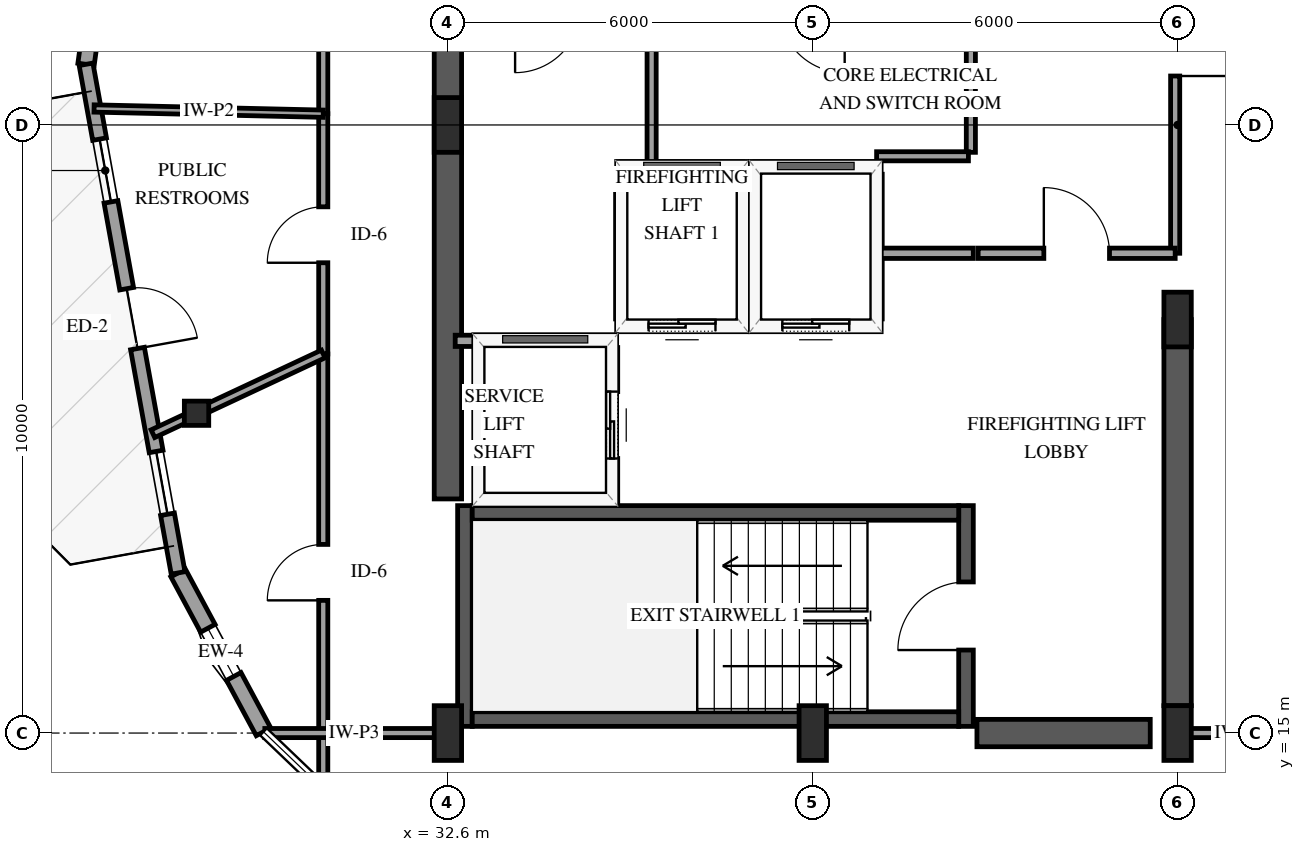
"""IFC4 building model, lengths in metres.
Left out: names, types, materials, properties, quantities, classifications, styles, units other than length and angle.
Written with IfcOpenShell. Run it as: python <this file> out.ifc"""

import sys

from ifc_helpers import new_model, si_unit, direction, frame, frame_2d, origin, origin_2d, place, context, subcontext, project, spatial, rectangle, i_section, extrude, element, fill, save


model = new_model("IFC4")
c1 = context("Model", 3, precision=1e-05, world=origin(), true_north=direction((0.0, 1.0)))
c2 = subcontext(c1, "Body", "Model", "MODEL_VIEW")
j1 = project(units=[si_unit("LENGTHUNIT", "METRE"), si_unit("PLANEANGLEUNIT", "RADIAN")], contexts=[c1])
p1 = place(None, origin())
s1 = spatial("IfcSite", under=j1, at=p1, CompositionType="ELEMENT")
p2 = place(p1, origin())
s2 = spatial("IfcBuilding", under=s1, at=p2, CompositionType="ELEMENT")
p3 = place(p2, frame((0.0, 0.0, 268.75)))
s3 = spatial("IfcBuildingStorey", under=s2, at=p3, CompositionType="ELEMENT", Elevation=268.75)
p4 = place(p3, frame((32.88, 15.11, 0.0), z_axis=(0.0, 0.0, 1.0), x_axis=(0.0, 1.0, 0.0)))
e1 = element("IfcWall", 1, at=p4, inside=s3, PredefinedType="SHEAR", context=c2, shape_type="SweptSolid", body=[
    extrude(rectangle(XDim=3.63, YDim=0.24, at=frame_2d((1.815, 0.0))), origin(), (0.0, 0.0, 1.0), 3.75),
])
p5 = place(p3, frame((41.12, 15.11, 0.0), z_axis=(0.0, 0.0, 1.0), x_axis=(0.0, 1.0, 0.0)))
e2 = element("IfcWall", 2, at=p5, inside=s3, PredefinedType="SHEAR", context=c2, shape_type="SweptSolid", body=[
    extrude(rectangle(XDim=3.63, YDim=0.24, at=frame_2d((1.815, 0.0))), origin(), (0.0, 0.0, 1.0), 3.75),
])
p6 = place(p5, frame((1.255, 0.0, 0.0)))
e3 = element("IfcOpeningElement", 3, at=p6, cuts=e2, PredefinedType="OPENING", context=c2, shape_type="SweptSolid", body=[
    extrude(rectangle(XDim=1.12, YDim=2.15, at=frame_2d((0.56, 1.075))), frame((0.0, 0.13, 0.0), z_axis=(0.0, -1.0, 0.0), x_axis=(1.0, 0.0, 0.0)), (0.0, 0.0, 1.0), 0.26),
])
for number, where, z_axis, x_axis in (
    (4, (33.0, 15.23, 0.0), (0.0, 0.0, 1.0), (1.0, 0.0, 0.0)),
    (5, (33.0, 18.62, 0.0), (0.0, 0.0, 1.0), (1.0, 0.0, 0.0)),
):
    element("IfcWall", number, at=place(p3, frame(where, z_axis=z_axis, x_axis=x_axis)), inside=s3, PredefinedType="SHEAR", context=c2, shape_type="SweptSolid", body=[
        extrude(rectangle(XDim=8.0, YDim=0.24, at=frame_2d((4.0, 0.0))), origin(), (0.0, 0.0, 1.0), 3.75),
    ])
p7 = place(p3, frame((32.6, 18.85, 0.0), z_axis=(0.0, 0.0, 1.0), x_axis=(0.0, 1.0, 0.0)))
e6 = element("IfcWall", 6, at=p7, inside=s3, PredefinedType="SHEAR", context=c2, shape_type="SweptSolid", body=[
    extrude(rectangle(XDim=12.3, YDim=0.45, at=frame_2d((6.15, 0.0))), origin(), (0.0, 0.0, 1.0), 3.75),
])
p8 = place(p3, frame((41.3, 15.0, 0.0), z_axis=(0.0, 0.0, 1.0), x_axis=(1.0, 0.0, 0.0)))
e7 = element("IfcWall", 7, at=p8, inside=s3, PredefinedType="SHEAR", context=c2, shape_type="SweptSolid", body=[
    extrude(rectangle(XDim=2.85, YDim=0.45, at=frame_2d((1.425, 0.0))), origin(), (0.0, 0.0, 1.0), 3.75),
])
p9 = place(p3, frame((44.6, 15.45, 0.0), z_axis=(0.0, 0.0, 1.0), x_axis=(0.0, 1.0, 0.0)))
e8 = element("IfcWall", 8, at=p9, inside=s3, PredefinedType="SHEAR", context=c2, shape_type="SweptSolid", body=[
    extrude(rectangle(XDim=6.35, YDim=0.45, at=frame_2d((3.175, 0.0))), origin(), (0.0, 0.0, 1.0), 3.75),
])
for number, where, z_axis, x_axis in (
    (9, (32.6, 15.0, 0.0), (0.0, 0.0, 1.0), (1.0, 0.0, 0.0)),
    (10, (32.6, 25.0, 0.0), (0.0, 0.0, 1.0), (1.0, 0.0, 0.0)),
    (11, (38.6, 15.0, 0.0), (0.0, 0.0, 1.0), (1.0, 0.0, 0.0)),
    (12, (44.6, 15.0, 0.0), (0.0, 0.0, 1.0), (1.0, 0.0, 0.0)),
    (13, (44.6, 21.8, 0.0), (0.0, 0.0, 1.0), (1.0, 0.0, 0.0)),
):
    element("IfcColumn", number, at=place(p3, frame(where, z_axis=z_axis, x_axis=x_axis)), inside=s3, PredefinedType="PILASTER", context=c2, shape_type="SweptSolid", body=[
        extrude(rectangle(XDim=0.45, YDim=0.9, at=origin_2d()), origin(), (0.0, 0.0, 1.0), 3.75),
    ])
p10 = place(p3, frame((28.466, 20.259, 0.0), z_axis=(0.0, 0.0, 1.0), x_axis=(1.0, 0.0, 0.0)))
e14 = element("IfcColumn", 14, at=p10, inside=s3, PredefinedType="COLUMN", context=c2, shape_type="SweptSolid", body=[
    extrude(i_section(OverallWidth=0.401, OverallDepth=0.399, WebThickness=0.025, FlangeThickness=0.04, FilletRadius=0.038, at=origin_2d()), origin(), (0.0, 0.0, 1.0), 3.75),
])
p11 = place(p3, frame((27.049, 28.937, 0.0), z_axis=(0.0, 0.0, 1.0), x_axis=(-0.134643093572, -0.99089416052, 0.0)))
e15 = element("IfcWall", 15, at=p11, inside=s3, PredefinedType="SOLIDWALL", context=c2, shape_type="SweptSolid", body=[
    extrude(rectangle(XDim=2.967, YDim=0.27, at=frame_2d((1.483, 0.0))), origin(), (0.0, 0.0, 1.0), 2.829),
])
p12 = place(p11, frame((1.033, 0.0, 0.75)))
e16 = element("IfcOpeningElement", 16, at=p12, cuts=e15, PredefinedType="OPENING", context=c2, shape_type="SweptSolid", body=[
    extrude(rectangle(XDim=0.9, YDim=1.5, at=frame_2d((0.45, 0.75))), frame((0.0, 0.145, 0.0), z_axis=(0.0, -1.0, 0.0), x_axis=(1.0, 0.0, 0.0)), (0.0, 0.0, 1.0), 0.29),
])
p13 = place(p3, frame((28.163, 17.633, 0.0), z_axis=(0.0, 0.0, 1.0), x_axis=(0.473486214629, -0.880801228744, 0.0)))
e17 = element("IfcWall", 17, at=p13, inside=s3, PredefinedType="SOLIDWALL", context=c2, shape_type="SweptSolid", body=[
    extrude(rectangle(XDim=2.966, YDim=0.27, at=frame_2d((1.483, 0.0))), origin(), (0.0, 0.0, 1.0), 2.829),
])
p14 = place(p13, frame((1.033, 0.0, 0.75)))
e18 = element("IfcOpeningElement", 18, at=p14, cuts=e17, PredefinedType="OPENING", context=c2, shape_type="SweptSolid", body=[
    extrude(rectangle(XDim=0.9, YDim=1.5, at=frame_2d((0.45, 0.75))), frame((0.0, 0.145, 0.0), z_axis=(0.0, -1.0, 0.0), x_axis=(1.0, 0.0, 0.0)), (0.0, 0.0, 1.0), 0.29),
])
p15 = place(p3, frame((26.649, 25.997, 0.0), z_axis=(0.0, 0.0, 1.0), x_axis=(0.178109410328, -0.984010689958, 0.0)))
e19 = element("IfcWall", 19, at=p15, inside=s3, PredefinedType="SOLIDWALL", context=c2, shape_type="SweptSolid", body=[
    extrude(rectangle(XDim=8.5, YDim=0.23, at=frame_2d((4.25, 0.0))), origin(), (0.0, 0.0, 1.0), 2.829),
])
p16 = place(p15, frame((3.75, 0.0, 0.0)))
e20 = element("IfcOpeningElement", 20, at=p16, cuts=e19, PredefinedType="OPENING", context=c2, shape_type="SweptSolid", body=[
    extrude(rectangle(XDim=1.0, YDim=2.15, at=frame_2d((0.5, 1.075))), frame((0.0, 0.125, 0.0), z_axis=(0.0, -1.0, 0.0), x_axis=(1.0, 0.0, 0.0)), (0.0, 0.0, 1.0), 0.25),
])
p17 = place(p15, frame((1.25, 0.0, 0.72)))
e21 = element("IfcOpeningElement", 21, at=p17, cuts=e19, PredefinedType="OPENING", context=c2, shape_type="SweptSolid", body=[
    extrude(rectangle(XDim=1.05, YDim=1.55, at=frame_2d((0.525, 0.775))), frame((0.0, 0.125, 0.0), z_axis=(0.0, -1.0, 0.0), x_axis=(1.0, 0.0, 0.0)), (0.0, 0.0, 1.0), 0.25),
])
p18 = place(p15, frame((6.47, 0.0, 0.72)))
e22 = element("IfcOpeningElement", 22, at=p18, cuts=e19, PredefinedType="OPENING", context=c2, shape_type="SweptSolid", body=[
    extrude(rectangle(XDim=1.05, YDim=1.55, at=frame_2d((0.525, 0.775))), frame((0.0, 0.125, 0.0), z_axis=(0.0, -1.0, 0.0), x_axis=(1.0, 0.0, 0.0)), (0.0, 0.0, 1.0), 0.25),
])
p19 = place(p3, frame((35.45, 21.7, 0.0), z_axis=(0.0, 0.0, 1.0), x_axis=(1.0, 0.0, 0.0)))
e23 = element("IfcWall", 23, at=p19, inside=s3, PredefinedType="SOLIDWALL", context=c2, shape_type="SweptSolid", body=[
    extrude(rectangle(XDim=2.0, YDim=0.185, at=frame_2d((1.0, 0.0))), origin(), (0.0, 0.0, 1.0), 3.45),
])
p20 = place(p19, frame((0.45, 0.0, 0.0)))
e24 = element("IfcOpeningElement", 24, at=p20, cuts=e23, PredefinedType="OPENING", context=c2, shape_type="SweptSolid", body=[
    extrude(rectangle(XDim=1.1, YDim=2.15, at=frame_2d((0.55, 1.075))), frame((0.0, 0.103, 0.0), z_axis=(0.0, -1.0, 0.0), x_axis=(1.0, 0.0, 0.0)), (0.0, 0.0, 1.0), 0.205),
])
p21 = place(p3, frame((35.45, 24.3, 0.0), z_axis=(0.0, 0.0, 1.0), x_axis=(1.0, 0.0, 0.0)))
e25 = element("IfcWall", 25, at=p21, inside=s3, PredefinedType="SOLIDWALL", context=c2, shape_type="SweptSolid", body=[
    extrude(rectangle(XDim=2.0, YDim=0.185, at=frame_2d((1.0, 0.0))), origin(), (0.0, 0.0, 1.0), 3.45),
])
for number, where, z_axis, x_axis in (
    (26, (35.45, 21.81, 0.0), (0.0, 0.0, 1.0), (0.0, 1.0, 0.0)),
    (27, (37.45, 21.81, 0.0), (0.0, 0.0, 1.0), (0.0, 1.0, 0.0)),
):
    element("IfcWall", number, at=place(p3, frame(where, z_axis=z_axis, x_axis=x_axis)), inside=s3, PredefinedType="SOLIDWALL", context=c2, shape_type="SweptSolid", body=[
        extrude(rectangle(XDim=2.38, YDim=0.185, at=frame_2d((1.19, 0.0))), origin(), (0.0, 0.0, 1.0), 3.45),
    ])
p22 = place(p3, frame((37.65, 21.7, 0.0), z_axis=(0.0, 0.0, 1.0), x_axis=(1.0, 0.0, 0.0)))
e28 = element("IfcWall", 28, at=p22, inside=s3, PredefinedType="SOLIDWALL", context=c2, shape_type="SweptSolid", body=[
    extrude(rectangle(XDim=2.0, YDim=0.185, at=frame_2d((1.0, 0.0))), origin(), (0.0, 0.0, 1.0), 3.45),
])
p23 = place(p22, frame((0.45, 0.0, 0.0)))
e29 = element("IfcOpeningElement", 29, at=p23, cuts=e28, PredefinedType="OPENING", context=c2, shape_type="SweptSolid", body=[
    extrude(rectangle(XDim=1.1, YDim=2.15, at=frame_2d((0.55, 1.075))), frame((0.0, 0.103, 0.0), z_axis=(0.0, -1.0, 0.0), x_axis=(1.0, 0.0, 0.0)), (0.0, 0.0, 1.0), 0.205),
])
p24 = place(p3, frame((37.65, 24.3, 0.0), z_axis=(0.0, 0.0, 1.0), x_axis=(1.0, 0.0, 0.0)))
e30 = element("IfcWall", 30, at=p24, inside=s3, PredefinedType="SOLIDWALL", context=c2, shape_type="SweptSolid", body=[
    extrude(rectangle(XDim=2.0, YDim=0.185, at=frame_2d((1.0, 0.0))), origin(), (0.0, 0.0, 1.0), 3.45),
])
p25 = place(p3, frame((39.65, 21.81, 0.0), z_axis=(0.0, 0.0, 1.0), x_axis=(0.0, 1.0, 0.0)))
e31 = element("IfcWall", 31, at=p25, inside=s3, PredefinedType="SOLIDWALL", context=c2, shape_type="SweptSolid", body=[
    extrude(rectangle(XDim=2.38, YDim=0.185, at=frame_2d((1.19, 0.0))), origin(), (0.0, 0.0, 1.0), 3.45),
])
p26 = place(p3, frame((32.72, 21.45, 0.0), z_axis=(0.0, 0.0, 1.0), x_axis=(1.0, 0.0, 0.0)))
e32 = element("IfcWall", 32, at=p26, inside=s3, PredefinedType="SOLIDWALL", context=c2, shape_type="SweptSolid", body=[
    extrude(rectangle(XDim=2.58, YDim=0.185, at=frame_2d((1.29, 0.0))), origin(), (0.0, 0.0, 1.0), 3.45),
])
p27 = place(p3, frame((35.3, 18.79, 0.0), z_axis=(0.0, 0.0, 1.0), x_axis=(0.0, 1.0, 0.0)))
e33 = element("IfcWall", 33, at=p27, inside=s3, PredefinedType="SOLIDWALL", context=c2, shape_type="SweptSolid", body=[
    extrude(rectangle(XDim=2.55, YDim=0.185, at=frame_2d((1.275, 0.0))), origin(), (0.0, 0.0, 1.0), 3.45),
])
p28 = place(p27, frame((0.725, 0.0, 0.0)))
e34 = element("IfcOpeningElement", 34, at=p28, cuts=e33, PredefinedType="OPENING", context=c2, shape_type="SweptSolid", body=[
    extrude(rectangle(XDim=1.1, YDim=2.15, at=frame_2d((0.55, 1.075))), frame((0.0, 0.103, 0.0), z_axis=(0.0, -1.0, 0.0), x_axis=(1.0, 0.0, 0.0)), (0.0, 0.0, 1.0), 0.205),
])
p29 = place(p3, frame((30.55, 25.185, 0.0), z_axis=(0.0, 0.0, 1.0), x_axis=(0.0, 1.0, 0.0)))
e35 = element("IfcWall", 35, at=p29, inside=s3, PredefinedType="PARTITIONING", context=c2, shape_type="SweptSolid", body=[
    extrude(rectangle(XDim=11.014, YDim=0.15, at=frame_2d((5.507, 0.0))), origin(), (0.0, 0.0, 1.0), 3.45),
])
p30 = place(p29, frame((1.177, 0.0, 0.0)))
e36 = element("IfcOpeningElement", 36, at=p30, cuts=e35, PredefinedType="OPENING", context=c2, shape_type="SweptSolid", body=[
    extrude(rectangle(XDim=0.92, YDim=2.12, at=frame_2d((0.46, 1.06))), frame((0.0, 0.085, 0.0), z_axis=(0.0, -1.0, 0.0), x_axis=(1.0, 0.0, 0.0)), (0.0, 0.0, 1.0), 0.17),
])
p31 = place(p3, frame((30.55, 14.08, 0.0), z_axis=(0.0, 0.0, 1.0), x_axis=(0.0, 1.0, 0.0)))
e37 = element("IfcWall", 37, at=p31, inside=s3, PredefinedType="PARTITIONING", context=c2, shape_type="SweptSolid", body=[
    extrude(rectangle(XDim=7.154, YDim=0.15, at=frame_2d((3.577, 0.0))), origin(), (0.0, 0.0, 1.0), 3.45),
])
p32 = place(p31, frame((3.102, 0.0, 0.0)))
e38 = element("IfcOpeningElement", 38, at=p32, cuts=e37, PredefinedType="OPENING", context=c2, shape_type="SweptSolid", body=[
    extrude(rectangle(XDim=0.92, YDim=2.12, at=frame_2d((0.46, 1.06))), frame((0.0, 0.085, 0.0), z_axis=(0.0, -1.0, 0.0), x_axis=(1.0, 0.0, 0.0)), (0.0, 0.0, 1.0), 0.17),
])
p33 = place(p3, frame((44.56, 29.8, 0.0), z_axis=(0.0, 0.0, 1.0), x_axis=(0.0, -1.0, 0.0)))
e39 = element("IfcWall", 39, at=p33, inside=s3, PredefinedType="PARTITIONING", context=c2, shape_type="SweptSolid", body=[
    extrude(rectangle(XDim=6.91, YDim=0.15, at=frame_2d((3.455, 0.0))), origin(), (0.0, 0.0, 1.0), 2.49),
])
p34 = place(p33, frame((2.915, 0.0, 0.0)))
e40 = element("IfcOpeningElement", 40, at=p34, cuts=e39, PredefinedType="OPENING", context=c2, shape_type="SweptSolid", body=[
    extrude(rectangle(XDim=1.08, YDim=2.15, at=frame_2d((0.54, 1.075))), frame((0.0, 0.085, 0.0), z_axis=(0.0, -1.0, 0.0), x_axis=(1.0, 0.0, 0.0)), (0.0, 0.0, 1.0), 0.17),
])
p35 = place(p3, frame((30.55, 21.234, 0.0), z_axis=(0.0, 0.0, 1.0), x_axis=(0.0, 1.0, 0.0)))
e41 = element("IfcWall", 41, at=p35, inside=s3, PredefinedType="PARTITIONING", context=c2, shape_type="SweptSolid", body=[
    extrude(rectangle(XDim=3.951, YDim=0.15, at=frame_2d((1.976, 0.0))), origin(), (0.0, 0.0, 1.0), 3.45),
])
p36 = place(p35, frame((1.5, 0.0, 0.0)))
e42 = element("IfcOpeningElement", 42, at=p36, cuts=e41, PredefinedType="OPENING", context=c2, shape_type="SweptSolid", body=[
    extrude(rectangle(XDim=0.92, YDim=2.12, at=frame_2d((0.46, 1.06))), frame((0.0, 0.085, 0.0), z_axis=(0.0, -1.0, 0.0), x_axis=(1.0, 0.0, 0.0)), (0.0, 0.0, 1.0), 0.17),
])
p37 = place(p3, frame((30.55, 25.185, 0.0), z_axis=(0.0, 0.0, 1.0), x_axis=(-0.999740161223, 0.02279495639, 0.0)))
e43 = element("IfcWall", 43, at=p37, inside=s3, PredefinedType="PARTITIONING", context=c2, shape_type="SweptSolid", body=[
    extrude(rectangle(XDim=3.77, YDim=0.12, at=frame_2d((1.885, 0.0))), origin(), (0.0, 0.0, 1.0), 3.45),
])
p38 = place(p3, frame((41.32, 22.89, 0.0), z_axis=(0.0, 0.0, 1.0), x_axis=(1.0, 0.0, 0.0)))
e44 = element("IfcWall", 44, at=p38, inside=s3, PredefinedType="PARTITIONING", context=c2, shape_type="SweptSolid", body=[
    extrude(rectangle(XDim=3.24, YDim=0.17, at=frame_2d((1.62, 0.0))), origin(), (0.0, 0.0, 1.0), 3.45),
])
p39 = place(p38, frame((1.08, 0.0, 0.0)))
e45 = element("IfcOpeningElement", 45, at=p39, cuts=e44, PredefinedType="OPENING", context=c2, shape_type="SweptSolid", body=[
    extrude(rectangle(XDim=1.08, YDim=2.15, at=frame_2d((0.54, 1.075))), frame((0.0, 0.095, 0.0), z_axis=(0.0, -1.0, 0.0), x_axis=(1.0, 0.0, 0.0)), (0.0, 0.0, 1.0), 0.19),
])
p40 = place(p3, frame((30.55, 21.234, 0.0), z_axis=(0.0, 0.0, 1.0), x_axis=(-0.905730852607, -0.423853303203, 0.0)))
e46 = element("IfcWall", 46, at=p40, inside=s3, PredefinedType="PARTITIONING", context=c2, shape_type="SweptSolid", body=[
    extrude(rectangle(XDim=3.093, YDim=0.14, at=frame_2d((1.546, 0.0))), origin(), (0.0, 0.0, 1.0), 3.45),
])
p41 = place(p3, frame((32.53, 15.0, 0.0), z_axis=(0.0, 0.0, 1.0), x_axis=(-1.0, 0.0, 0.0)))
e47 = element("IfcWall", 47, at=p41, inside=s3, PredefinedType="PARTITIONING", context=c2, shape_type="SweptSolid", body=[
    extrude(rectangle(XDim=2.941, YDim=0.15, at=frame_2d((1.47, 0.0))), origin(), (0.0, 0.0, 1.0), 3.45),
])
p42 = place(p3, frame((35.95, 26.88, 0.0), z_axis=(0.0, 0.0, 1.0), x_axis=(0.0, -1.0, 0.0)))
e48 = element("IfcWall", 48, at=p42, inside=s3, PredefinedType="PARTITIONING", context=c2, shape_type="SweptSolid", body=[
    extrude(rectangle(XDim=2.58, YDim=0.15, at=frame_2d((1.29, 0.0))), origin(), (0.0, 0.0, 1.0), 3.45),
])
p43 = place(p3, frame((41.2, 24.55, 0.0), z_axis=(0.0, 0.0, 1.0), x_axis=(0.0, 1.0, 0.0)))
e49 = element("IfcWall", 49, at=p43, inside=s3, PredefinedType="PARTITIONING", context=c2, shape_type="SweptSolid", body=[
    extrude(rectangle(XDim=2.33, YDim=0.15, at=frame_2d((1.165, 0.0))), origin(), (0.0, 0.0, 1.0), 3.45),
])
p44 = place(p3, frame((46.58, 15.0, 0.0), z_axis=(0.0, 0.0, 1.0), x_axis=(-1.0, 0.0, 0.0)))
e50 = element("IfcWall", 50, at=p44, inside=s3, PredefinedType="PARTITIONING", context=c2, shape_type="SweptSolid", body=[
    extrude(rectangle(XDim=1.91, YDim=0.15, at=frame_2d((0.955, 0.0))), origin(), (0.0, 0.0, 1.0), 3.45),
])
p45 = place(p3, frame((39.72, 22.89, 0.0), z_axis=(0.0, 0.0, 1.0), x_axis=(1.0, 0.0, 0.0)))
e51 = element("IfcWall", 51, at=p45, inside=s3, PredefinedType="PARTITIONING", context=c2, shape_type="SweptSolid", body=[
    extrude(rectangle(XDim=1.52, YDim=0.17, at=frame_2d((0.76, 0.0))), origin(), (0.0, 0.0, 1.0), 3.45),
])
p46 = place(p3, frame((39.65, 24.485, 0.0), z_axis=(0.0, 0.0, 1.0), x_axis=(1.0, 0.0, 0.0)))
e52 = element("IfcWall", 52, at=p46, inside=s3, PredefinedType="PARTITIONING", context=c2, shape_type="SweptSolid", body=[
    extrude(rectangle(XDim=1.51, YDim=0.15, at=frame_2d((0.755, 0.0))), origin(), (0.0, 0.0, 1.0), 3.45),
])
p47 = place(p14, origin())
e53 = element("IfcWindow", 53, at=p47, inside=s3, PartitioningType="SINGLE_PANEL", PredefinedType="WINDOW", context=c2, shape_type="SweptSolid", body=[
    extrude(rectangle(XDim=0.9, YDim=1.5, at=frame_2d((0.45, 0.75))), frame((0.0, 0.03, 0.0), z_axis=(0.0, -1.0, 0.0), x_axis=(1.0, 0.0, 0.0)), (0.0, 0.0, 1.0), 0.06),
])
fill(e18, e53)
p48 = place(p16, origin())
e54 = element("IfcDoor", 54, at=p48, inside=s3, OperationType="SINGLE_SWING_RIGHT", PredefinedType="DOOR", context=c2, shape_type="SweptSolid", body=[
    extrude(rectangle(XDim=1.0, YDim=2.15, at=frame_2d((0.5, 1.075))), frame((0.0, 0.025, 0.0), z_axis=(0.0, -1.0, 0.0), x_axis=(1.0, 0.0, 0.0)), (0.0, 0.0, 1.0), 0.05),
])
fill(e20, e54)
p49 = place(p17, origin())
e55 = element("IfcWindow", 55, at=p49, inside=s3, PartitioningType="SINGLE_PANEL", PredefinedType="WINDOW", context=c2, shape_type="SweptSolid", body=[
    extrude(rectangle(XDim=1.05, YDim=1.55, at=frame_2d((0.525, 0.775))), frame((0.0, 0.03, 0.0), z_axis=(0.0, -1.0, 0.0), x_axis=(1.0, 0.0, 0.0)), (0.0, 0.0, 1.0), 0.06),
])
fill(e21, e55)
p50 = place(p18, origin())
e56 = element("IfcWindow", 56, at=p50, inside=s3, PartitioningType="SINGLE_PANEL", PredefinedType="WINDOW", context=c2, shape_type="SweptSolid", body=[
    extrude(rectangle(XDim=1.05, YDim=1.55, at=frame_2d((0.525, 0.775))), frame((0.0, 0.03, 0.0), z_axis=(0.0, -1.0, 0.0), x_axis=(1.0, 0.0, 0.0)), (0.0, 0.0, 1.0), 0.06),
])
fill(e22, e56)
p51 = place(p20, origin())
e57 = element("IfcDoor", 57, at=p51, inside=s3, OperationType="SLIDING_TO_LEFT", PredefinedType="DOOR", context=c2, shape_type="SweptSolid", body=[
    extrude(rectangle(XDim=1.1, YDim=2.15, at=frame_2d((0.55, 1.075))), frame((0.0, 0.025, 0.0), z_axis=(0.0, -1.0, 0.0), x_axis=(1.0, 0.0, 0.0)), (0.0, 0.0, 1.0), 0.05),
])
fill(e24, e57)
p52 = place(p23, origin())
e58 = element("IfcDoor", 58, at=p52, inside=s3, OperationType="SLIDING_TO_LEFT", PredefinedType="DOOR", context=c2, shape_type="SweptSolid", body=[
    extrude(rectangle(XDim=1.1, YDim=2.15, at=frame_2d((0.55, 1.075))), frame((0.0, 0.025, 0.0), z_axis=(0.0, -1.0, 0.0), x_axis=(1.0, 0.0, 0.0)), (0.0, 0.0, 1.0), 0.05),
])
fill(e29, e58)
p53 = place(p28, origin())
e59 = element("IfcDoor", 59, at=p53, inside=s3, OperationType="SLIDING_TO_LEFT", PredefinedType="DOOR", context=c2, shape_type="SweptSolid", body=[
    extrude(rectangle(XDim=1.1, YDim=2.15, at=frame_2d((0.55, 1.075))), frame((0.0, 0.025, 0.0), z_axis=(0.0, -1.0, 0.0), x_axis=(1.0, 0.0, 0.0)), (0.0, 0.0, 1.0), 0.05),
])
fill(e34, e59)
p54 = place(p6, origin())
e60 = element("IfcDoor", 60, at=p54, inside=s3, OperationType="SINGLE_SWING_LEFT", PredefinedType="DOOR", context=c2, shape_type="SweptSolid", body=[
    extrude(rectangle(XDim=1.12, YDim=2.15, at=frame_2d((0.56, 1.075))), frame((0.0, 0.025, 0.0), z_axis=(0.0, -1.0, 0.0), x_axis=(1.0, 0.0, 0.0)), (0.0, 0.0, 1.0), 0.05),
])
fill(e3, e60)
p55 = place(p32, origin())
e61 = element("IfcDoor", 61, at=p55, inside=s3, OperationType="SINGLE_SWING_LEFT", PredefinedType="DOOR", context=c2, shape_type="SweptSolid", body=[
    extrude(rectangle(XDim=0.92, YDim=2.12, at=frame_2d((0.46, 1.06))), frame((0.0, 0.025, 0.0), z_axis=(0.0, -1.0, 0.0), x_axis=(1.0, 0.0, 0.0)), (0.0, 0.0, 1.0), 0.05),
])
fill(e38, e61)
p56 = place(p34, origin())
e62 = element("IfcDoor", 62, at=p56, inside=s3, OperationType="SINGLE_SWING_RIGHT", PredefinedType="DOOR", context=c2, shape_type="SweptSolid", body=[
    extrude(rectangle(XDim=1.08, YDim=2.15, at=frame_2d((0.54, 1.075))), frame((0.0, 0.025, 0.0), z_axis=(0.0, -1.0, 0.0), x_axis=(1.0, 0.0, 0.0)), (0.0, 0.0, 1.0), 0.05),
])
fill(e40, e62)
p57 = place(p36, origin())
e63 = element("IfcDoor", 63, at=p57, inside=s3, OperationType="SINGLE_SWING_LEFT", PredefinedType="DOOR", context=c2, shape_type="SweptSolid", body=[
    extrude(rectangle(XDim=0.92, YDim=2.12, at=frame_2d((0.46, 1.06))), frame((0.0, 0.025, 0.0), z_axis=(0.0, -1.0, 0.0), x_axis=(1.0, 0.0, 0.0)), (0.0, 0.0, 1.0), 0.05),
])
fill(e42, e63)
p58 = place(p39, origin())
e64 = element("IfcDoor", 64, at=p58, inside=s3, OperationType="SINGLE_SWING_LEFT", PredefinedType="DOOR", context=c2, shape_type="SweptSolid", body=[
    extrude(rectangle(XDim=1.08, YDim=2.15, at=frame_2d((0.54, 1.075))), frame((0.0, 0.025, 0.0), z_axis=(0.0, -1.0, 0.0), x_axis=(1.0, 0.0, 0.0)), (0.0, 0.0, 1.0), 0.05),
])
fill(e45, e64)
save(model, sys.argv[1])
